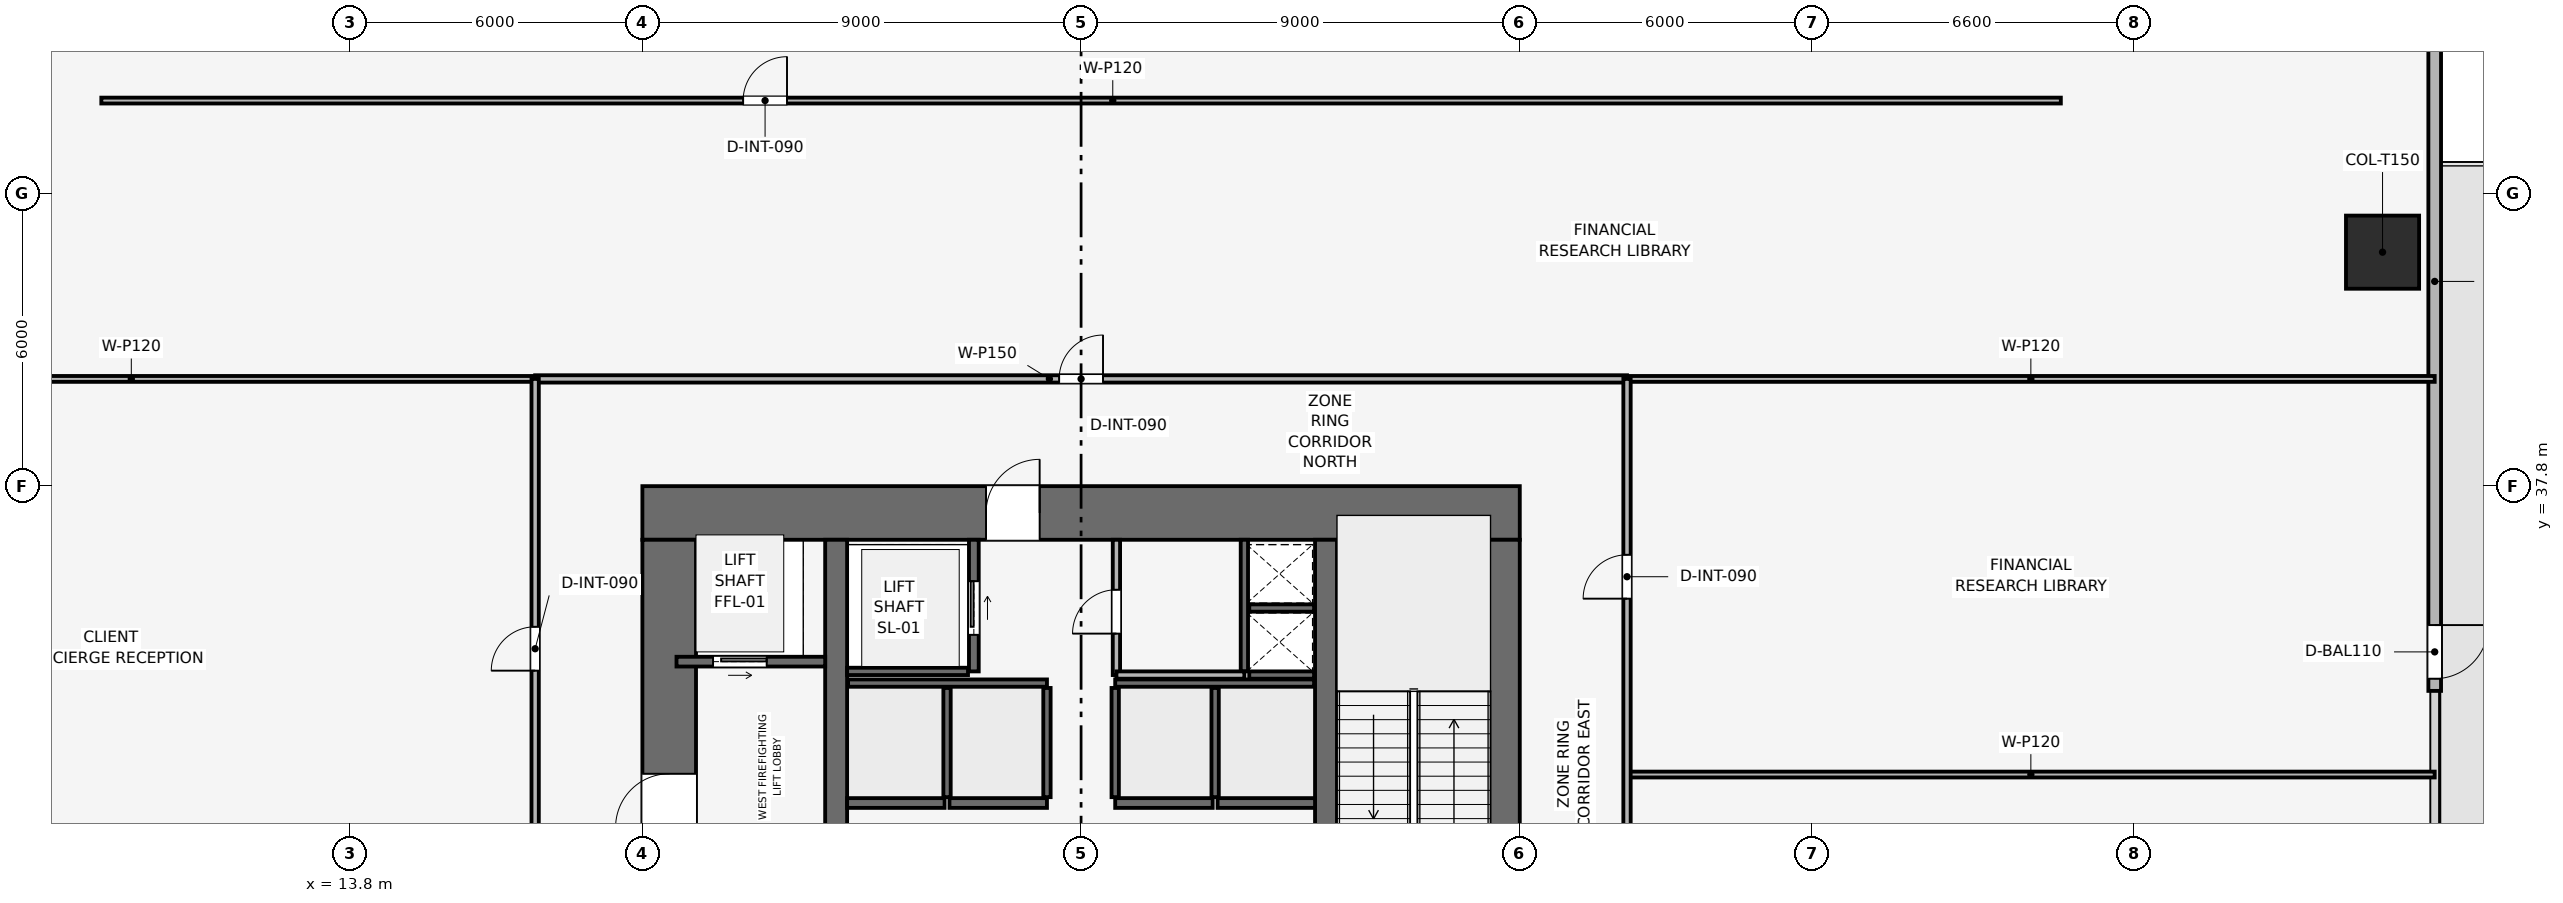
"""IFC4 building model, lengths in metres.
Left out: names, types, materials, properties, quantities, classifications, styles, units other than length and angle.
Written with IfcOpenShell. Run it as: python <this file> out.ifc"""

import sys

from ifc_helpers import new_model, si_unit, direction, frame, frame_2d, origin, origin_2d, place, context, subcontext, project, spatial, rectangle, extrude, element, fill, save


model = new_model("IFC4")
c1 = context("Model", 3, precision=1e-05, world=origin(), true_north=direction((0.0, 1.0)))
c2 = subcontext(c1, "Body", "Model", "MODEL_VIEW")
j1 = project(units=[si_unit("LENGTHUNIT", "METRE"), si_unit("PLANEANGLEUNIT", "RADIAN")], contexts=[c1])
p1 = place(None, origin())
s1 = spatial("IfcSite", under=j1, at=p1, CompositionType="ELEMENT")
p2 = place(p1, origin())
s2 = spatial("IfcBuilding", under=s1, at=p2, CompositionType="ELEMENT")
p3 = place(p2, frame((0.0, 0.0, 37.8)))
s3 = spatial("IfcBuildingStorey", under=s2, at=p3, CompositionType="ELEMENT", Elevation=37.8)
p4 = place(p3, frame((19.8, 37.25, 0.0), z_axis=(0.0, 0.0, 1.0), x_axis=(1.0, 0.0, 0.0)))
e1 = element("IfcWall", 1, at=p4, inside=s3, PredefinedType="SHEAR", context=c2, shape_type="SweptSolid", body=[
    extrude(rectangle(XDim=18.0, YDim=1.1, at=frame_2d((9.0, 0.0))), origin(), (0.0, 0.0, 1.0), 3.9),
])
p5 = place(p4, frame((7.05, 0.0, 0.0)))
e2 = element("IfcOpeningElement", 2, at=p5, cuts=e1, PredefinedType="OPENING", context=c2, shape_type="SweptSolid", body=[
    extrude(rectangle(XDim=1.1, YDim=2.15, at=frame_2d((0.55, 1.075))), frame((0.0, 0.56, 0.0), z_axis=(0.0, -1.0, 0.0), x_axis=(1.0, 0.0, 0.0)), (0.0, 0.0, 1.0), 1.12),
])
p6 = place(p3, frame((20.35, 20.9, 0.0), z_axis=(0.0, 0.0, 1.0), x_axis=(0.0, 1.0, 0.0)))
e3 = element("IfcWall", 3, at=p6, inside=s3, PredefinedType="SHEAR", context=c2, shape_type="SweptSolid", body=[
    extrude(rectangle(XDim=15.8, YDim=1.1, at=frame_2d((7.9, 0.0))), origin(), (0.0, 0.0, 1.0), 3.9),
])
p7 = place(p6, frame((9.9, 0.0, 0.0)))
e4 = element("IfcOpeningElement", 4, at=p7, cuts=e3, PredefinedType="OPENING", context=c2, shape_type="SweptSolid", body=[
    extrude(rectangle(XDim=1.1, YDim=2.15, at=frame_2d((0.55, 1.075))), frame((0.0, 0.56, 0.0), z_axis=(0.0, -1.0, 0.0), x_axis=(1.0, 0.0, 0.0)), (0.0, 0.0, 1.0), 1.12),
])
p8 = place(p3, frame((37.25, 20.9, 0.0), z_axis=(0.0, 0.0, 1.0), x_axis=(0.0, 1.0, 0.0)))
e5 = element("IfcWall", 5, at=p8, inside=s3, PredefinedType="SHEAR", context=c2, shape_type="SweptSolid", body=[
    extrude(rectangle(XDim=15.8, YDim=1.1, at=frame_2d((7.9, 0.0))), origin(), (0.0, 0.0, 1.0), 3.9),
])
p9 = place(p8, frame((4.4, 0.0, 0.0)))
e6 = element("IfcOpeningElement", 6, at=p9, cuts=e5, PredefinedType="OPENING", context=c2, shape_type="SweptSolid", body=[
    extrude(rectangle(XDim=1.1, YDim=2.15, at=frame_2d((0.55, 1.075))), frame((0.0, 0.56, 0.0), z_axis=(0.0, -1.0, 0.0), x_axis=(1.0, 0.0, 0.0)), (0.0, 0.0, 1.0), 1.12),
])
for number, where, z_axis, x_axis in (
    (7, (23.775, 20.9, 0.0), (0.0, 0.0, 1.0), (0.0, 1.0, 0.0)),
    (8, (33.825, 20.9, 0.0), (0.0, 0.0, 1.0), (0.0, 1.0, 0.0)),
):
    element("IfcWall", number, at=place(p3, frame(where, z_axis=z_axis, x_axis=x_axis)), inside=s3, PredefinedType="SHEAR", context=c2, shape_type="SweptSolid", body=[
        extrude(rectangle(XDim=15.8, YDim=0.45, at=frame_2d((7.9, 0.0))), origin(), (0.0, 0.0, 1.0), 3.9),
    ])
p10 = place(p3, frame((55.5, 42.6, 0.003), z_axis=(0.0, 0.0, 1.0), x_axis=(1.0, 0.0, 0.0)))
e9 = element("IfcColumn", 9, at=p10, inside=s3, PredefinedType="COLUMN", context=c2, shape_type="SweptSolid", body=[
    extrude(rectangle(XDim=1.5, YDim=1.5, at=origin_2d()), origin(), (0.0, 0.0, 1.0), 3.644),
])
p11 = place(p3, frame((56.57, 48.9, 0.0), z_axis=(0.0, 0.0, 1.0), x_axis=(0.0, -1.0, 0.0)))
e10 = element("IfcWall", 10, at=p11, inside=s3, PredefinedType="SOLIDWALL", context=c2, shape_type="SweptSolid", body=[
    extrude(rectangle(XDim=15.3, YDim=0.26, at=frame_2d((7.65, 0.0))), origin(), (0.0, 0.0, 1.0), 3.65),
])
p12 = place(p11, frame((13.95, 0.0, 0.0)))
e11 = element("IfcOpeningElement", 11, at=p12, cuts=e10, PredefinedType="OPENING", context=c2, shape_type="SweptSolid", body=[
    extrude(rectangle(XDim=1.1, YDim=2.2, at=frame_2d((0.55, 1.1))), frame((0.0, 0.14, 0.0), z_axis=(0.0, -1.0, 0.0), x_axis=(1.0, 0.0, 0.0)), (0.0, 0.0, 1.0), 0.28),
])
p13 = place(p3, frame((32.15, 34.0, 0.0), z_axis=(0.0, 0.0, 1.0), x_axis=(0.0, 1.0, 0.0)))
e12 = element("IfcWall", 12, at=p13, inside=s3, PredefinedType="SHEAR", context=c2, shape_type="SweptSolid", body=[
    extrude(rectangle(XDim=2.7, YDim=0.15, at=frame_2d((1.35, 0.0))), origin(), (0.0, 0.0, 1.0), 3.65),
])
for number, where, z_axis, x_axis in (
    (13, (32.25, 33.925, 0.0), (0.0, 0.0, 1.0), (1.0, 0.0, 0.0)),
    (14, (32.25, 35.3, 0.0), (0.0, 0.0, 1.0), (1.0, 0.0, 0.0)),
):
    element("IfcWall", number, at=place(p3, frame(where, z_axis=z_axis, x_axis=x_axis)), inside=s3, PredefinedType="SHEAR", context=c2, shape_type="SweptSolid", body=[
        extrude(rectangle(XDim=1.33, YDim=0.15, at=frame_2d((0.665, 0.0))), origin(), (0.0, 0.0, 1.0), 3.65),
    ])
p14 = place(p3, frame((20.5, 34.2, 0.0), z_axis=(0.0, 0.0, 1.0), x_axis=(1.0, 0.0, 0.0)))
e15 = element("IfcWall", 15, at=p14, inside=s3, PredefinedType="SHEAR", context=c2, shape_type="SweptSolid", body=[
    extrude(rectangle(XDim=3.05, YDim=0.2, at=frame_2d((1.525, 0.0))), origin(), (0.0, 0.0, 1.0), 3.65),
])
p15 = place(p14, frame((0.75, 0.0, 0.0)))
e16 = element("IfcOpeningElement", 16, at=p15, cuts=e15, PredefinedType="OPENING", context=c2, shape_type="SweptSolid", body=[
    extrude(rectangle(XDim=1.1, YDim=2.15, at=frame_2d((0.55, 1.075))), frame((0.0, 0.11, 0.0), z_axis=(0.0, -1.0, 0.0), x_axis=(1.0, 0.0, 0.0)), (0.0, 0.0, 1.0), 0.22),
])
p16 = place(p3, frame((26.6, 34.0, 0.0), z_axis=(0.0, 0.0, 1.0), x_axis=(0.0, 1.0, 0.0)))
e17 = element("IfcWall", 17, at=p16, inside=s3, PredefinedType="SHEAR", context=c2, shape_type="SweptSolid", body=[
    extrude(rectangle(XDim=2.7, YDim=0.2, at=frame_2d((1.35, 0.0))), origin(), (0.0, 0.0, 1.0), 3.65),
])
p17 = place(p16, frame((0.75, 0.0, 0.0)))
e18 = element("IfcOpeningElement", 18, at=p17, cuts=e17, PredefinedType="OPENING", context=c2, shape_type="SweptSolid", body=[
    extrude(rectangle(XDim=1.1, YDim=2.15, at=frame_2d((0.55, 1.075))), frame((0.0, 0.11, 0.0), z_axis=(0.0, -1.0, 0.0), x_axis=(1.0, 0.0, 0.0)), (0.0, 0.0, 1.0), 0.22),
])
p18 = place(p3, frame((24.0, 34.0, 0.0), z_axis=(0.0, 0.0, 1.0), x_axis=(1.0, 0.0, 0.0)))
e19 = element("IfcWall", 19, at=p18, inside=s3, PredefinedType="SHEAR", context=c2, shape_type="SweptSolid", body=[
    extrude(rectangle(XDim=2.48, YDim=0.15, at=frame_2d((1.24, 0.0))), origin(), (0.0, 0.0, 1.0), 3.65),
])
for number, where, z_axis, x_axis in (
    (20, (24.0, 31.3, 0.0), (0.0, 0.0, 1.0), (1.0, 0.0, 0.0)),
    (21, (26.1, 31.3, 0.0), (0.0, 0.0, 1.0), (1.0, 0.0, 0.0)),
    (22, (29.5, 31.3, 0.0), (0.0, 0.0, 1.0), (1.0, 0.0, 0.0)),
    (23, (31.6, 31.3, 0.0), (0.0, 0.0, 1.0), (1.0, 0.0, 0.0)),
):
    element("IfcWall", number, at=place(p3, frame(where, z_axis=z_axis, x_axis=x_axis)), inside=s3, PredefinedType="SHEAR", context=c2, shape_type="SweptSolid", body=[
        extrude(rectangle(XDim=2.0, YDim=0.2, at=frame_2d((1.0, 0.0))), origin(), (0.0, 0.0, 1.0), 3.65),
    ])
for number, where, z_axis, x_axis in (
    (24, (24.02, 33.76, 0.0), (0.0, 0.0, 1.0), (1.0, 0.0, 0.0)),
    (25, (29.5, 33.76, 0.0), (0.0, 0.0, 1.0), (1.0, 0.0, 0.0)),
):
    element("IfcWall", number, at=place(p3, frame(where, z_axis=z_axis, x_axis=x_axis)), inside=s3, PredefinedType="SHEAR", context=c2, shape_type="SweptSolid", body=[
        extrude(rectangle(XDim=4.08, YDim=0.15, at=frame_2d((2.04, 0.0))), origin(), (0.0, 0.0, 1.0), 3.65),
    ])
for number, where, z_axis, x_axis in (
    (26, (26.05, 31.42, 0.0), (0.0, 0.0, 1.0), (0.0, 1.0, 0.0)),
    (27, (28.1, 31.42, 0.0), (0.0, 0.0, 1.0), (0.0, 1.0, 0.0)),
    (28, (29.5, 31.42, 0.0), (0.0, 0.0, 1.0), (0.0, 1.0, 0.0)),
    (29, (31.55, 31.42, 0.0), (0.0, 0.0, 1.0), (0.0, 1.0, 0.0)),
):
    element("IfcWall", number, at=place(p3, frame(where, z_axis=z_axis, x_axis=x_axis)), inside=s3, PredefinedType="SHEAR", context=c2, shape_type="SweptSolid", body=[
        extrude(rectangle(XDim=2.24, YDim=0.15, at=frame_2d((1.12, 0.0))), origin(), (0.0, 0.0, 1.0), 3.65),
    ])
p19 = place(p3, frame((29.525, 33.925, 0.0), z_axis=(0.0, 0.0, 1.0), x_axis=(0.0, 1.0, 0.0)))
e30 = element("IfcWall", 30, at=p19, inside=s3, PredefinedType="PARTITIONING", context=c2, shape_type="SweptSolid", body=[
    extrude(rectangle(XDim=2.775, YDim=0.15, at=frame_2d((1.387, 0.0))), origin(), (0.0, 0.0, 1.0), 3.65),
])
p20 = place(p19, frame((0.85, 0.0, 0.0)))
e31 = element("IfcOpeningElement", 31, at=p20, cuts=e30, PredefinedType="OPENING", context=c2, shape_type="SweptSolid", body=[
    extrude(rectangle(XDim=0.9, YDim=2.1, at=frame_2d((0.45, 1.05))), frame((0.0, 0.085, 0.0), z_axis=(0.0, -1.0, 0.0), x_axis=(1.0, 0.0, 0.0)), (0.0, 0.0, 1.0), 0.17),
])
p21 = place(p3, frame((29.525, 33.925, 0.0), z_axis=(0.0, 0.0, 1.0), x_axis=(1.0, 0.0, 0.0)))
e32 = element("IfcWall", 32, at=p21, inside=s3, PredefinedType="PARTITIONING", context=c2, shape_type="SweptSolid", body=[
    extrude(rectangle(XDim=2.625, YDim=0.15, at=frame_2d((1.312, 0.0))), origin(), (0.0, 0.0, 1.0), 3.65),
])
p22 = place(p3, frame((8.7, 45.71, 0.0), z_axis=(0.0, 0.0, 1.0), x_axis=(1.0, 0.0, 0.0)))
e33 = element("IfcWall", 33, at=p22, inside=s3, PredefinedType="PARTITIONING", context=c2, shape_type="SweptSolid", body=[
    extrude(rectangle(XDim=40.2, YDim=0.12, at=frame_2d((20.1, 0.0))), origin(), (0.0, 0.0, 1.0), 3.085),
])
p23 = place(p22, frame((13.167, 0.0, 0.0)))
e34 = element("IfcOpeningElement", 34, at=p23, cuts=e33, PredefinedType="OPENING", context=c2, shape_type="SweptSolid", body=[
    extrude(rectangle(XDim=0.9, YDim=2.1, at=frame_2d((0.45, 1.05))), frame((0.0, 0.07, 0.0), z_axis=(0.0, -1.0, 0.0), x_axis=(1.0, 0.0, 0.0)), (0.0, 0.0, 1.0), 0.14),
])
for number, where, z_axis, x_axis in (
    (35, (1.03, 40.0, 0.0), (0.0, 0.0, 1.0), (1.0, 0.0, 0.0)),
    (36, (40.0, 40.0, 0.0), (0.0, 0.0, 1.0), (1.0, 0.0, 0.0)),
    (37, (40.0, 31.884, 0.0), (0.0, 0.0, 1.0), (1.0, 0.0, 0.0)),
):
    element("IfcWall", number, at=place(p3, frame(where, z_axis=z_axis, x_axis=x_axis)), inside=s3, PredefinedType="PARTITIONING", context=c2, shape_type="SweptSolid", body=[
        extrude(rectangle(XDim=16.57, YDim=0.12, at=frame_2d((8.285, 0.0))), origin(), (0.0, 0.0, 1.0), 2.935),
    ])
p24 = place(p3, frame((17.6, 40.0, 0.0), z_axis=(0.0, 0.0, 1.0), x_axis=(1.0, 0.0, 0.0)))
e38 = element("IfcWall", 38, at=p24, inside=s3, PredefinedType="PARTITIONING", context=c2, shape_type="SweptSolid", body=[
    extrude(rectangle(XDim=22.4, YDim=0.15, at=frame_2d((11.2, 0.0))), origin(), (0.0, 0.0, 1.0), 3.085),
])
p25 = place(p24, frame((10.75, 0.0, 0.0)))
e39 = element("IfcOpeningElement", 39, at=p25, cuts=e38, PredefinedType="OPENING", context=c2, shape_type="SweptSolid", body=[
    extrude(rectangle(XDim=0.9, YDim=2.1, at=frame_2d((0.45, 1.05))), frame((0.0, 0.085, 0.0), z_axis=(0.0, -1.0, 0.0), x_axis=(1.0, 0.0, 0.0)), (0.0, 0.0, 1.0), 0.17),
])
p26 = place(p3, frame((17.6, 17.6, 0.0), z_axis=(0.0, 0.0, 1.0), x_axis=(0.0, 1.0, 0.0)))
e40 = element("IfcWall", 40, at=p26, inside=s3, PredefinedType="PARTITIONING", context=c2, shape_type="SweptSolid", body=[
    extrude(rectangle(XDim=22.4, YDim=0.15, at=frame_2d((11.2, 0.0))), origin(), (0.0, 0.0, 1.0), 3.085),
])
p27 = place(p26, frame((0.7, 0.0, 0.0)))
e41 = element("IfcOpeningElement", 41, at=p27, cuts=e40, PredefinedType="OPENING", context=c2, shape_type="SweptSolid", body=[
    extrude(rectangle(XDim=0.9, YDim=2.1, at=frame_2d((0.45, 1.05))), frame((0.0, 0.085, 0.0), z_axis=(0.0, -1.0, 0.0), x_axis=(1.0, 0.0, 0.0)), (0.0, 0.0, 1.0), 0.17),
])
p28 = place(p26, frame((6.365, 0.0, 0.0)))
e42 = element("IfcOpeningElement", 42, at=p28, cuts=e40, PredefinedType="OPENING", context=c2, shape_type="SweptSolid", body=[
    extrude(rectangle(XDim=0.9, YDim=2.1, at=frame_2d((0.45, 1.05))), frame((0.0, 0.085, 0.0), z_axis=(0.0, -1.0, 0.0), x_axis=(1.0, 0.0, 0.0)), (0.0, 0.0, 1.0), 0.17),
])
p29 = place(p26, frame((16.415, 0.0, 0.0)))
e43 = element("IfcOpeningElement", 43, at=p29, cuts=e40, PredefinedType="OPENING", context=c2, shape_type="SweptSolid", body=[
    extrude(rectangle(XDim=0.9, YDim=2.1, at=frame_2d((0.45, 1.05))), frame((0.0, 0.085, 0.0), z_axis=(0.0, -1.0, 0.0), x_axis=(1.0, 0.0, 0.0)), (0.0, 0.0, 1.0), 0.17),
])
p30 = place(p3, frame((40.0, 17.6, 0.0), z_axis=(0.0, 0.0, 1.0), x_axis=(0.0, 1.0, 0.0)))
e44 = element("IfcWall", 44, at=p30, inside=s3, PredefinedType="PARTITIONING", context=c2, shape_type="SweptSolid", body=[
    extrude(rectangle(XDim=22.4, YDim=0.15, at=frame_2d((11.2, 0.0))), origin(), (0.0, 0.0, 1.0), 3.085),
])
p31 = place(p30, frame((0.7, 0.0, 0.0)))
e45 = element("IfcOpeningElement", 45, at=p31, cuts=e44, PredefinedType="OPENING", context=c2, shape_type="SweptSolid", body=[
    extrude(rectangle(XDim=0.9, YDim=2.1, at=frame_2d((0.45, 1.05))), frame((0.0, 0.085, 0.0), z_axis=(0.0, -1.0, 0.0), x_axis=(1.0, 0.0, 0.0)), (0.0, 0.0, 1.0), 0.17),
])
p32 = place(p30, frame((4.699, 0.0, 0.0)))
e46 = element("IfcOpeningElement", 46, at=p32, cuts=e44, PredefinedType="OPENING", context=c2, shape_type="SweptSolid", body=[
    extrude(rectangle(XDim=0.9, YDim=2.1, at=frame_2d((0.45, 1.05))), frame((0.0, 0.085, 0.0), z_axis=(0.0, -1.0, 0.0), x_axis=(1.0, 0.0, 0.0)), (0.0, 0.0, 1.0), 0.17),
])
p33 = place(p30, frame((10.692, 0.0, 0.0)))
e47 = element("IfcOpeningElement", 47, at=p33, cuts=e44, PredefinedType="OPENING", context=c2, shape_type="SweptSolid", body=[
    extrude(rectangle(XDim=0.9, YDim=2.1, at=frame_2d((0.45, 1.05))), frame((0.0, 0.085, 0.0), z_axis=(0.0, -1.0, 0.0), x_axis=(1.0, 0.0, 0.0)), (0.0, 0.0, 1.0), 0.17),
])
p34 = place(p30, frame((17.892, 0.0, 0.0)))
e48 = element("IfcOpeningElement", 48, at=p34, cuts=e44, PredefinedType="OPENING", context=c2, shape_type="SweptSolid", body=[
    extrude(rectangle(XDim=0.9, YDim=2.1, at=frame_2d((0.45, 1.05))), frame((0.0, 0.085, 0.0), z_axis=(0.0, -1.0, 0.0), x_axis=(1.0, 0.0, 0.0)), (0.0, 0.0, 1.0), 0.17),
])
p35 = place(p12, origin())
e49 = element("IfcDoor", 49, at=p35, inside=s3, OperationType="SINGLE_SWING_LEFT", PredefinedType="DOOR", context=c2, shape_type="SweptSolid", body=[
    extrude(rectangle(XDim=1.1, YDim=2.2, at=frame_2d((0.55, 1.1))), frame((0.0, 0.025, 0.0), z_axis=(0.0, -1.0, 0.0), x_axis=(1.0, 0.0, 0.0)), (0.0, 0.0, 1.0), 0.05),
])
fill(e11, e49)
p36 = place(p15, origin())
e50 = element("IfcDoor", 50, at=p36, inside=s3, OperationType="SLIDING_TO_RIGHT", PredefinedType="DOOR", context=c2, shape_type="SweptSolid", body=[
    extrude(rectangle(XDim=1.1, YDim=2.15, at=frame_2d((0.55, 1.075))), frame((0.0, 0.025, 0.0), z_axis=(0.0, -1.0, 0.0), x_axis=(1.0, 0.0, 0.0)), (0.0, 0.0, 1.0), 0.05),
])
fill(e16, e50)
p37 = place(p17, origin())
e51 = element("IfcDoor", 51, at=p37, inside=s3, OperationType="SLIDING_TO_RIGHT", PredefinedType="DOOR", context=c2, shape_type="SweptSolid", body=[
    extrude(rectangle(XDim=1.1, YDim=2.15, at=frame_2d((0.55, 1.075))), frame((0.0, 0.025, 0.0), z_axis=(0.0, -1.0, 0.0), x_axis=(1.0, 0.0, 0.0)), (0.0, 0.0, 1.0), 0.05),
])
fill(e18, e51)
p38 = place(p20, origin())
e52 = element("IfcDoor", 52, at=p38, inside=s3, OperationType="SINGLE_SWING_LEFT", PredefinedType="DOOR", context=c2, shape_type="SweptSolid", body=[
    extrude(rectangle(XDim=0.9, YDim=2.1, at=frame_2d((0.45, 1.05))), frame((0.0, 0.025, 0.0), z_axis=(0.0, -1.0, 0.0), x_axis=(1.0, 0.0, 0.0)), (0.0, 0.0, 1.0), 0.05),
])
fill(e31, e52)
p39 = place(p23, origin())
e53 = element("IfcDoor", 53, at=p39, inside=s3, OperationType="SINGLE_SWING_RIGHT", PredefinedType="DOOR", context=c2, shape_type="SweptSolid", body=[
    extrude(rectangle(XDim=0.9, YDim=2.1, at=frame_2d((0.45, 1.05))), frame((0.0, 0.025, 0.0), z_axis=(0.0, -1.0, 0.0), x_axis=(1.0, 0.0, 0.0)), (0.0, 0.0, 1.0), 0.05),
])
fill(e34, e53)
p40 = place(p25, origin())
e54 = element("IfcDoor", 54, at=p40, inside=s3, OperationType="SINGLE_SWING_RIGHT", PredefinedType="DOOR", context=c2, shape_type="SweptSolid", body=[
    extrude(rectangle(XDim=0.9, YDim=2.1, at=frame_2d((0.45, 1.05))), frame((0.0, 0.025, 0.0), z_axis=(0.0, -1.0, 0.0), x_axis=(1.0, 0.0, 0.0)), (0.0, 0.0, 1.0), 0.05),
])
fill(e39, e54)
p41 = place(p29, origin())
e55 = element("IfcDoor", 55, at=p41, inside=s3, OperationType="SINGLE_SWING_LEFT", PredefinedType="DOOR", context=c2, shape_type="SweptSolid", body=[
    extrude(rectangle(XDim=0.9, YDim=2.1, at=frame_2d((0.45, 1.05))), frame((0.0, 0.025, 0.0), z_axis=(0.0, -1.0, 0.0), x_axis=(1.0, 0.0, 0.0)), (0.0, 0.0, 1.0), 0.05),
])
fill(e43, e55)
p42 = place(p34, origin())
e56 = element("IfcDoor", 56, at=p42, inside=s3, OperationType="SINGLE_SWING_LEFT", PredefinedType="DOOR", context=c2, shape_type="SweptSolid", body=[
    extrude(rectangle(XDim=0.9, YDim=2.1, at=frame_2d((0.45, 1.05))), frame((0.0, 0.025, 0.0), z_axis=(0.0, -1.0, 0.0), x_axis=(1.0, 0.0, 0.0)), (0.0, 0.0, 1.0), 0.05),
])
fill(e48, e56)
p43 = place(p7, origin())
e57 = element("IfcDoor", 57, at=p43, inside=s3, OperationType="SINGLE_SWING_LEFT", PredefinedType="DOOR", context=c2, shape_type="SweptSolid", body=[
    extrude(rectangle(XDim=1.1, YDim=2.15, at=frame_2d((0.55, 1.075))), frame((0.0, 0.025, 0.0), z_axis=(0.0, -1.0, 0.0), x_axis=(1.0, 0.0, 0.0)), (0.0, 0.0, 1.0), 0.05),
])
fill(e4, e57)
p44 = place(p5, origin())
e58 = element("IfcDoor", 58, at=p44, inside=s3, OperationType="SINGLE_SWING_RIGHT", PredefinedType="DOOR", context=c2, shape_type="SweptSolid", body=[
    extrude(rectangle(XDim=1.1, YDim=2.15, at=frame_2d((0.55, 1.075))), frame((0.0, 0.025, 0.0), z_axis=(0.0, -1.0, 0.0), x_axis=(1.0, 0.0, 0.0)), (0.0, 0.0, 1.0), 0.05),
])
fill(e2, e58)
save(model, sys.argv[1])
